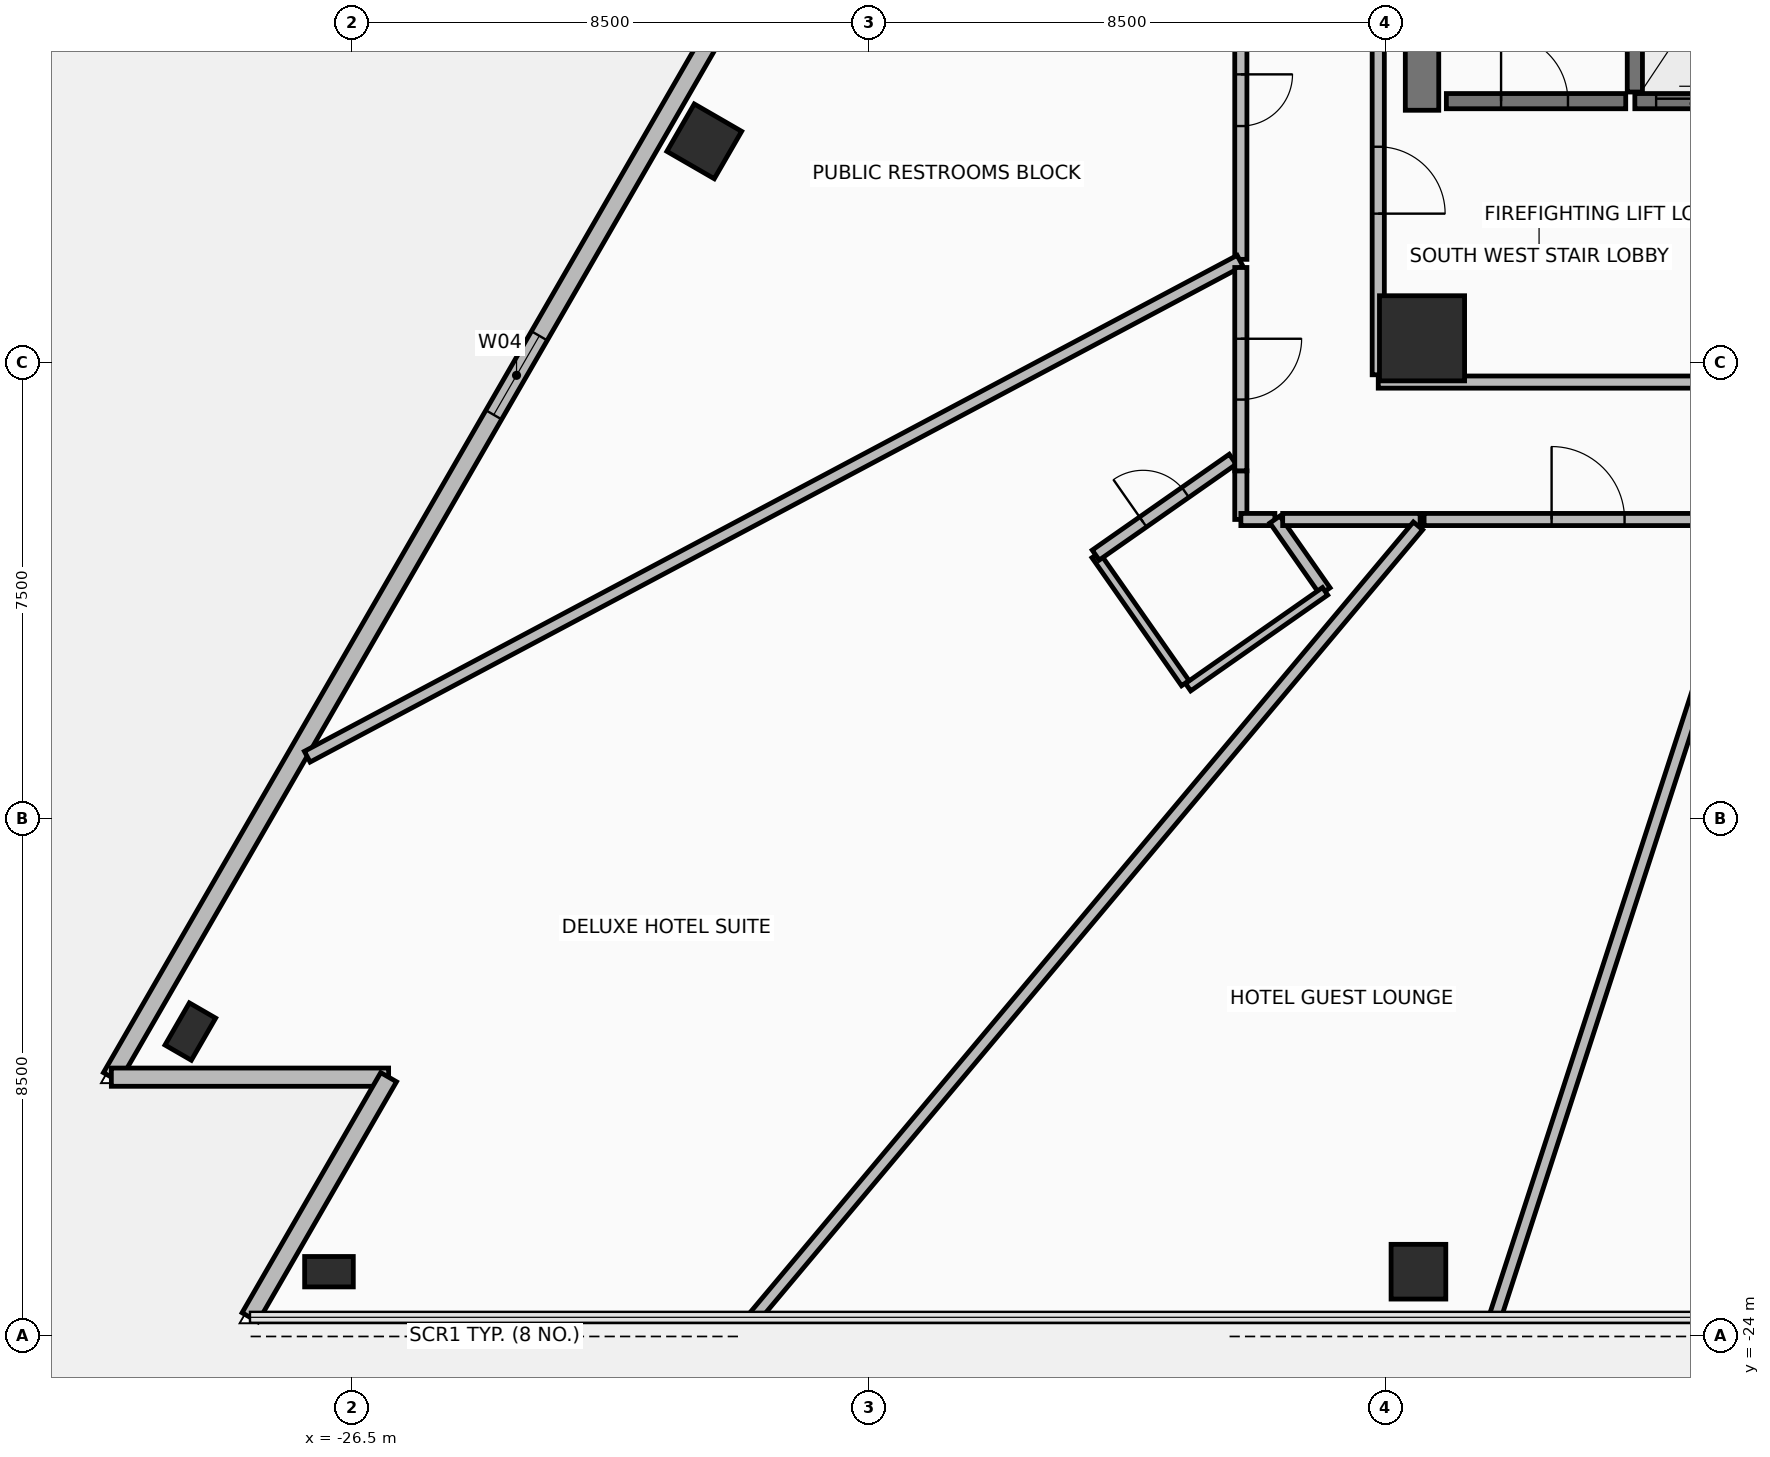
"""IFC4 building model, lengths in metres.
Left out: names, types, materials, properties, quantities, classifications, styles, units other than length and angle.
Written with IfcOpenShell. Run it as: python <this file> out.ifc"""

import sys

from ifc_helpers import new_model, si_unit, direction, frame, frame_2d, origin, origin_2d, place, context, subcontext, project, spatial, rectangle, hollow_rectangle, extrude, element, fill, save


model = new_model("IFC4")
c1 = context("Model", 3, precision=1e-05, world=origin(), true_north=direction((0.0, 1.0)))
c2 = subcontext(c1, "Body", "Model", "MODEL_VIEW")
j1 = project(units=[si_unit("LENGTHUNIT", "METRE"), si_unit("PLANEANGLEUNIT", "RADIAN")], contexts=[c1])
p1 = place(None, origin())
s1 = spatial("IfcSite", under=j1, at=p1, CompositionType="ELEMENT")
p2 = place(p1, origin())
s2 = spatial("IfcBuilding", under=s1, at=p2, CompositionType="ELEMENT")
p3 = place(p2, frame((0.0, 0.0, 31.8)))
s3 = spatial("IfcBuildingStorey", under=s2, at=p3, CompositionType="ELEMENT", Elevation=31.8)
p4 = place(p3, frame((-8.9, -7.6, 0.0), z_axis=(0.0, 0.0, 1.0), x_axis=(1.0, 0.0, 0.0)))
e1 = element("IfcColumn", 1, at=p4, inside=s3, PredefinedType="COLUMN", context=c2, shape_type="SweptSolid", body=[
    extrude(rectangle(XDim=1.4, YDim=1.4, at=origin_2d()), origin(), (0.0, 0.0, 1.0), 3.45),
])
p5 = place(p3, frame((-20.705, -4.361, 0.0), z_axis=(0.0, 0.0, 1.0), x_axis=(0.500001511499, 0.866024531118, 0.0)))
e2 = element("IfcColumn", 2, at=p5, inside=s3, PredefinedType="COLUMN", context=c2, shape_type="SweptSolid", body=[
    extrude(hollow_rectangle(XDim=0.9, YDim=0.9, WallThickness=0.05, at=origin_2d()), origin(), (0.0, 0.0, 1.0), 3.45),
])
for number, where, z_axis, x_axis in (
    (3, (-29.157, -19.001, 0.0), (0.0, 0.0, 1.0), (0.5, 0.866, 0.0)),
    (4, (-26.877, -22.95, 0.0), (0.0, 0.0, 1.0), (1.0, 0.0, 0.0)),
):
    element("IfcColumn", number, at=place(p3, frame(where, z_axis=z_axis, x_axis=x_axis)), inside=s3, PredefinedType="COLUMN", context=c2, shape_type="SweptSolid", body=[
        extrude(hollow_rectangle(XDim=0.5, YDim=0.8, WallThickness=0.04, at=origin_2d()), origin(), (0.0, 0.0, 1.0), 3.45),
    ])
p6 = place(p3, frame((-8.959, -22.95, 0.0), z_axis=(0.0, 0.0, 1.0), x_axis=(1.0, 0.0, 0.0)))
e5 = element("IfcColumn", 5, at=p6, inside=s3, PredefinedType="COLUMN", context=c2, shape_type="SweptSolid", body=[
    extrude(hollow_rectangle(XDim=0.9, YDim=0.9, WallThickness=0.05, at=origin_2d()), origin(), (0.0, 0.0, 1.0), 3.45),
])
p7 = place(p3, frame((-3.8, 26.418, 0.0), z_axis=(0.0, 0.0, 1.0), x_axis=(-0.499999546436, -0.86602566565, 0.0)))
e6 = element("IfcWall", 6, at=p7, inside=s3, PredefinedType="STANDARD", context=c2, shape_type="SweptSolid", body=[
    extrude(rectangle(XDim=53.312, YDim=0.3, at=frame_2d((26.656, 0.0))), origin(), (0.0, 0.0, 1.0), 3.275),
])
p8 = place(p7, frame((25.756, 0.0, 0.0)))
e7 = element("IfcOpeningElement", 7, at=p8, cuts=e6, PredefinedType="OPENING", context=c2, shape_type="SweptSolid", body=[
    extrude(rectangle(XDim=1.8, YDim=2.3, at=frame_2d((0.9, 1.15))), frame((0.0, 0.16, 0.0), z_axis=(0.0, -1.0, 0.0), x_axis=(1.0, 0.0, 0.0)), (0.0, 0.0, 1.0), 0.32),
])
p9 = place(p7, frame((12.578, 0.0, 0.85)))
e8 = element("IfcOpeningElement", 8, at=p9, cuts=e6, PredefinedType="OPENING", context=c2, shape_type="SweptSolid", body=[
    extrude(rectangle(XDim=1.5, YDim=2.1, at=frame_2d((0.75, 1.05))), frame((0.0, 0.16, 0.0), z_axis=(0.0, -1.0, 0.0), x_axis=(1.0, 0.0, 0.0)), (0.0, 0.0, 1.0), 0.32),
])
p10 = place(p7, frame((39.234, 0.0, 0.85)))
e9 = element("IfcOpeningElement", 9, at=p10, cuts=e6, PredefinedType="OPENING", context=c2, shape_type="SweptSolid", body=[
    extrude(rectangle(XDim=1.5, YDim=2.1, at=frame_2d((0.75, 1.05))), frame((0.0, 0.16, 0.0), z_axis=(0.0, -1.0, 0.0), x_axis=(1.0, 0.0, 0.0)), (0.0, 0.0, 1.0), 0.32),
])
p11 = place(p3, frame((-30.456, -19.751, 0.0), z_axis=(0.0, 0.0, 1.0), x_axis=(1.0, 0.0, 0.0)))
e10 = element("IfcWall", 10, at=p11, inside=s3, PredefinedType="STANDARD", context=c2, shape_type="SweptSolid", body=[
    extrude(rectangle(XDim=4.56, YDim=0.3, at=frame_2d((2.28, 0.0))), origin(), (0.0, 0.0, 1.0), 2.47),
])
p12 = place(p3, frame((-25.896, -19.751, 0.0), z_axis=(0.0, 0.0, 1.0), x_axis=(-0.500014431597, -0.866017071537, 0.0)))
e11 = element("IfcWall", 11, at=p12, inside=s3, PredefinedType="STANDARD", context=c2, shape_type="SweptSolid", body=[
    extrude(rectangle(XDim=4.56, YDim=0.3, at=frame_2d((2.28, 0.0))), origin(), (0.0, 0.0, 1.0), 2.47),
])
p13 = place(p3, frame((-8.9, -3.85, 0.0), z_axis=(0.0, 0.0, 1.0), x_axis=(0.0, 1.0, 0.0)))
e12 = element("IfcWall", 12, at=p13, inside=s3, PredefinedType="SHEAR", context=c2, shape_type="SweptSolid", body=[
    extrude(rectangle(XDim=10.7, YDim=0.55, at=frame_2d((5.35, 0.0))), origin(), (0.0, 0.0, 1.0), 3.275),
])
p14 = place(p3, frame((-9.62, -8.32, 0.0), z_axis=(0.0, 0.0, 1.0), x_axis=(1.0, 0.0, 0.0)))
e13 = element("IfcWall", 13, at=p14, inside=s3, PredefinedType="PARTITIONING", context=c2, shape_type="SweptSolid", body=[
    extrude(rectangle(XDim=19.24, YDim=0.2, at=frame_2d((9.62, 0.0))), origin(), (0.0, 0.0, 1.0), 2.67),
])
p15 = place(p3, frame((-9.62, 8.2, 0.0), z_axis=(0.0, 0.0, 1.0), x_axis=(0.0, -1.0, 0.0)))
e14 = element("IfcWall", 14, at=p15, inside=s3, PredefinedType="PARTITIONING", context=c2, shape_type="SweptSolid", body=[
    extrude(rectangle(XDim=16.4, YDim=0.2, at=frame_2d((8.2, 0.0))), origin(), (0.0, 0.0, 1.0), 2.67),
])
p16 = place(p15, frame((12.65, 0.0, 0.0)))
e15 = element("IfcOpeningElement", 15, at=p16, cuts=e14, PredefinedType="OPENING", context=c2, shape_type="SweptSolid", body=[
    extrude(rectangle(XDim=1.1, YDim=2.15, at=frame_2d((0.55, 1.075))), frame((0.0, 0.11, 0.0), z_axis=(0.0, -1.0, 0.0), x_axis=(1.0, 0.0, 0.0)), (0.0, 0.0, 1.0), 0.22),
])
p17 = place(p3, frame((-5.4, -3.55, 0.0), z_axis=(0.0, 0.0, 1.0), x_axis=(0.0, 1.0, 0.0)))
e16 = element("IfcWall", 16, at=p17, inside=s3, PredefinedType="SHEAR", context=c2, shape_type="SweptSolid", body=[
    extrude(rectangle(XDim=7.3, YDim=0.25, at=frame_2d((3.65, 0.0))), origin(), (0.0, 0.0, 1.0), 3.275),
])
p18 = place(p3, frame((-8.5, -3.7, 0.0), z_axis=(0.0, 0.0, 1.0), x_axis=(1.0, 0.0, 0.0)))
e17 = element("IfcWall", 17, at=p18, inside=s3, PredefinedType="SHEAR", context=c2, shape_type="SweptSolid", body=[
    extrude(rectangle(XDim=2.95, YDim=0.25, at=frame_2d((1.475, 0.0))), origin(), (0.0, 0.0, 1.0), 3.275),
])
p19 = place(p18, frame((0.9, 0.0, 0.0)))
e18 = element("IfcOpeningElement", 18, at=p19, cuts=e17, PredefinedType="OPENING", context=c2, shape_type="SweptSolid", body=[
    extrude(rectangle(XDim=1.1, YDim=2.15, at=frame_2d((0.55, 1.075))), frame((0.0, 0.135, 0.0), z_axis=(0.0, -1.0, 0.0), x_axis=(1.0, 0.0, 0.0)), (0.0, 0.0, 1.0), 0.27),
])
p20 = place(p3, frame((-5.4, -3.7, 0.0), z_axis=(0.0, 0.0, 1.0), x_axis=(1.0, 0.0, 0.0)))
e19 = element("IfcWall", 19, at=p20, inside=s3, PredefinedType="SHEAR", context=c2, shape_type="SweptSolid", body=[
    extrude(rectangle(XDim=1.9, YDim=0.25, at=frame_2d((0.95, 0.0))), origin(), (0.0, 0.0, 1.0), 3.275),
])
p21 = place(p20, frame((0.35, 0.0, 0.0)))
e20 = element("IfcOpeningElement", 20, at=p21, cuts=e19, PredefinedType="OPENING", context=c2, shape_type="SweptSolid", body=[
    extrude(rectangle(XDim=1.2, YDim=2.2, at=frame_2d((0.6, 1.1))), frame((0.0, 0.135, 0.0), z_axis=(0.0, -1.0, 0.0), x_axis=(1.0, 0.0, 0.0)), (0.0, 0.0, 1.0), 0.27),
])
p22 = place(p3, frame((-11.88, -9.78, 0.0), z_axis=(0.0, 0.0, 1.0), x_axis=(0.0, -1.0, 0.0)))
e21 = element("IfcWall", 21, at=p22, inside=s3, PredefinedType="PARTITIONING", context=c2, shape_type="SweptSolid", body=[
    extrude(rectangle(XDim=0.8, YDim=0.2, at=frame_2d((0.4, 0.0))), origin(), (0.0, 0.0, 1.0), 2.67),
])
p23 = place(p3, frame((-11.879, -10.58, 0.0), z_axis=(0.0, 0.0, 1.0), x_axis=(1.0, 0.0, 0.0)))
e22 = element("IfcWall", 22, at=p23, inside=s3, PredefinedType="PARTITIONING", context=c2, shape_type="SweptSolid", body=[
    extrude(rectangle(XDim=0.559, YDim=0.2, at=frame_2d((0.28, 0.0))), origin(), (0.0, 0.0, 1.0), 3.275),
])
p24 = place(p3, frame((-11.32, -10.58, 0.0), z_axis=(0.0, 0.0, 1.0), x_axis=(0.573177949093, -0.819430923674, 0.0)))
e23 = element("IfcWall", 23, at=p24, inside=s3, PredefinedType="PARTITIONING", context=c2, shape_type="SweptSolid", body=[
    extrude(rectangle(XDim=1.44, YDim=0.2, at=frame_2d((0.72, 0.0))), origin(), (0.0, 0.0, 1.0), 3.275),
])
p25 = place(p3, frame((-10.494, -11.76, 0.0), z_axis=(0.0, 0.0, 1.0), x_axis=(-0.819398712469, -0.573223996361, 0.0)))
e24 = element("IfcWall", 24, at=p25, inside=s3, PredefinedType="PARTITIONING", context=c2, shape_type="SweptSolid", body=[
    extrude(rectangle(XDim=2.75, YDim=0.15, at=frame_2d((1.375, 0.0))), origin(), (0.0, 0.0, 1.0), 3.275),
])
p26 = place(p3, frame((-12.794, -13.271, 0.0), z_axis=(0.0, 0.0, 1.0), x_axis=(-0.573130756233, 0.819463932251, 0.0)))
e25 = element("IfcWall", 25, at=p26, inside=s3, PredefinedType="PARTITIONING", context=c2, shape_type="SweptSolid", body=[
    extrude(rectangle(XDim=2.57, YDim=0.15, at=frame_2d((1.285, 0.0))), origin(), (0.0, 0.0, 1.0), 2.67),
])
p27 = place(p3, frame((-14.267, -11.165, 0.0), z_axis=(0.0, 0.0, 1.0), x_axis=(0.81944041023, 0.573164386614, 0.0)))
e26 = element("IfcWall", 26, at=p27, inside=s3, PredefinedType="PARTITIONING", context=c2, shape_type="SweptSolid", body=[
    extrude(rectangle(XDim=2.75, YDim=0.2, at=frame_2d((1.375, 0.0))), origin(), (0.0, 0.0, 1.0), 2.67),
])
p28 = place(p27, frame((0.95, 0.0, 0.0)))
e27 = element("IfcOpeningElement", 27, at=p28, cuts=e26, PredefinedType="OPENING", context=c2, shape_type="SweptSolid", body=[
    extrude(rectangle(XDim=0.85, YDim=2.1, at=frame_2d((0.425, 1.05))), frame((0.0, 0.11, 0.0), z_axis=(0.0, -1.0, 0.0), x_axis=(1.0, 0.0, 0.0)), (0.0, 0.0, 1.0), 0.22),
])
p29 = place(p3, frame((-11.88, -1.067, 0.0), z_axis=(0.0, 0.0, 1.0), x_axis=(0.0, -1.0, 0.0)))
e28 = element("IfcWall", 28, at=p29, inside=s3, PredefinedType="PARTITIONING", context=c2, shape_type="SweptSolid", body=[
    extrude(rectangle(XDim=5.235, YDim=0.2, at=frame_2d((2.618, 0.0))), origin(), (0.0, 0.0, 1.0), 3.275),
])
p30 = place(p29, frame((2.193, 0.0, 0.0)))
e29 = element("IfcOpeningElement", 29, at=p30, cuts=e28, PredefinedType="OPENING", context=c2, shape_type="SweptSolid", body=[
    extrude(rectangle(XDim=0.85, YDim=2.1, at=frame_2d((0.425, 1.05))), frame((0.0, 0.11, 0.0), z_axis=(0.0, -1.0, 0.0), x_axis=(1.0, 0.0, 0.0)), (0.0, 0.0, 1.0), 0.22),
])
p31 = place(p3, frame((-11.893, -6.324, 0.0), z_axis=(0.0, 0.0, 1.0), x_axis=(-0.882947372325, -0.46947197755, 0.0)))
e30 = element("IfcWall", 30, at=p31, inside=s3, PredefinedType="PARTITIONING", context=c2, shape_type="SweptSolid", body=[
    extrude(rectangle(XDim=17.374, YDim=0.2, at=frame_2d((8.687, 0.0))), origin(), (0.0, 0.0, 1.0), 2.47),
])
p32 = place(p3, frame((-11.88, -6.436, 0.0), z_axis=(0.0, 0.0, 1.0), x_axis=(0.0, -1.0, 0.0)))
e31 = element("IfcWall", 31, at=p32, inside=s3, PredefinedType="PARTITIONING", context=c2, shape_type="SweptSolid", body=[
    extrude(rectangle(XDim=3.344, YDim=0.2, at=frame_2d((1.672, 0.0))), origin(), (0.0, 0.0, 1.0), 2.67),
])
p33 = place(p32, frame((1.172, 0.0, 0.0)))
e32 = element("IfcOpeningElement", 32, at=p33, cuts=e31, PredefinedType="OPENING", context=c2, shape_type="SweptSolid", body=[
    extrude(rectangle(XDim=1.0, YDim=2.15, at=frame_2d((0.5, 1.075))), frame((0.0, 0.11, 0.0), z_axis=(0.0, -1.0, 0.0), x_axis=(1.0, 0.0, 0.0)), (0.0, 0.0, 1.0), 0.22),
])
p34 = place(p3, frame((-11.192, -10.58, 0.0), z_axis=(0.0, 0.0, 1.0), x_axis=(1.0, 0.0, 0.0)))
e33 = element("IfcWall", 33, at=p34, inside=s3, PredefinedType="PARTITIONING", context=c2, shape_type="SweptSolid", body=[
    extrude(rectangle(XDim=2.26, YDim=0.2, at=frame_2d((1.13, 0.0))), origin(), (0.0, 0.0, 1.0), 2.67),
])
p35 = place(p3, frame((-8.966, -10.685, 0.0), z_axis=(0.0, 0.0, 1.0), x_axis=(-0.642784617016, -0.766046954258, 0.0)))
e34 = element("IfcWall", 34, at=p35, inside=s3, PredefinedType="PARTITIONING", context=c2, shape_type="SweptSolid", body=[
    extrude(rectangle(XDim=16.978, YDim=0.2, at=frame_2d((8.489, 0.0))), origin(), (0.0, 0.0, 1.0), 2.47),
])
p36 = place(p3, frame((-8.866, -10.58, 0.0), z_axis=(0.0, 0.0, 1.0), x_axis=(1.0, 0.0, 0.0)))
e35 = element("IfcWall", 35, at=p36, inside=s3, PredefinedType="PARTITIONING", context=c2, shape_type="SweptSolid", body=[
    extrude(rectangle(XDim=5.394, YDim=0.2, at=frame_2d((2.697, 0.0))), origin(), (0.0, 0.0, 1.0), 2.67),
])
p37 = place(p36, frame((2.097, 0.0, 0.0)))
e36 = element("IfcOpeningElement", 36, at=p37, cuts=e35, PredefinedType="OPENING", context=c2, shape_type="SweptSolid", body=[
    extrude(rectangle(XDim=1.2, YDim=2.15, at=frame_2d((0.6, 1.075))), frame((0.0, 0.11, 0.0), z_axis=(0.0, -1.0, 0.0), x_axis=(1.0, 0.0, 0.0)), (0.0, 0.0, 1.0), 0.22),
])
p38 = place(p3, frame((-3.448, -10.613, 0.0), z_axis=(0.0, 0.0, 1.0), x_axis=(-0.309029029702, -0.951052605696, 0.0)))
e37 = element("IfcWall", 37, at=p38, inside=s3, PredefinedType="PARTITIONING", context=c2, shape_type="SweptSolid", body=[
    extrude(rectangle(XDim=13.742, YDim=0.2, at=frame_2d((6.871, 0.0))), origin(), (0.0, 0.0, 1.0), 2.47),
])
p39 = place(p10, origin())
e38 = element("IfcWindow", 38, at=p39, inside=s3, PartitioningType="SINGLE_PANEL", PredefinedType="WINDOW", context=c2, shape_type="SweptSolid", body=[
    extrude(rectangle(XDim=1.5, YDim=2.1, at=frame_2d((0.75, 1.05))), frame((0.0, 0.03, 0.0), z_axis=(0.0, -1.0, 0.0), x_axis=(1.0, 0.0, 0.0)), (0.0, 0.0, 1.0), 0.06),
])
fill(e9, e38)
p40 = place(p16, frame((1.1, 0.0, 0.0), z_axis=(0.0, 0.0, 1.0), x_axis=(-1.0, 0.0, 0.0)))
e39 = element("IfcDoor", 39, at=p40, inside=s3, OperationType="SINGLE_SWING_LEFT", PredefinedType="DOOR", context=c2, shape_type="SweptSolid", body=[
    extrude(rectangle(XDim=1.1, YDim=2.15, at=frame_2d((0.55, 1.075))), frame((0.0, 0.025, 0.0), z_axis=(0.0, -1.0, 0.0), x_axis=(1.0, 0.0, 0.0)), (0.0, 0.0, 1.0), 0.05),
])
fill(e15, e39)
p41 = place(p19, origin())
e40 = element("IfcDoor", 40, at=p41, inside=s3, OperationType="SINGLE_SWING_LEFT", PredefinedType="DOOR", context=c2, shape_type="SweptSolid", body=[
    extrude(rectangle(XDim=1.1, YDim=2.15, at=frame_2d((0.55, 1.075))), frame((0.0, 0.025, 0.0), z_axis=(0.0, -1.0, 0.0), x_axis=(1.0, 0.0, 0.0)), (0.0, 0.0, 1.0), 0.05),
])
fill(e18, e40)
p42 = place(p21, origin())
e41 = element("IfcDoor", 41, at=p42, inside=s3, OperationType="SLIDING_TO_RIGHT", PredefinedType="DOOR", context=c2, shape_type="SweptSolid", body=[
    extrude(rectangle(XDim=1.2, YDim=2.2, at=frame_2d((0.6, 1.1))), frame((0.0, 0.025, 0.0), z_axis=(0.0, -1.0, 0.0), x_axis=(1.0, 0.0, 0.0)), (0.0, 0.0, 1.0), 0.05),
])
fill(e20, e41)
p43 = place(p28, origin())
e42 = element("IfcDoor", 42, at=p43, inside=s3, OperationType="SINGLE_SWING_RIGHT", PredefinedType="DOOR", context=c2, shape_type="SweptSolid", body=[
    extrude(rectangle(XDim=0.85, YDim=2.1, at=frame_2d((0.425, 1.05))), frame((0.0, 0.025, 0.0), z_axis=(0.0, -1.0, 0.0), x_axis=(1.0, 0.0, 0.0)), (0.0, 0.0, 1.0), 0.05),
])
fill(e27, e42)
p44 = place(p30, origin())
e43 = element("IfcDoor", 43, at=p44, inside=s3, OperationType="SINGLE_SWING_RIGHT", PredefinedType="DOOR", context=c2, shape_type="SweptSolid", body=[
    extrude(rectangle(XDim=0.85, YDim=2.1, at=frame_2d((0.425, 1.05))), frame((0.0, 0.025, 0.0), z_axis=(0.0, -1.0, 0.0), x_axis=(1.0, 0.0, 0.0)), (0.0, 0.0, 1.0), 0.05),
])
fill(e29, e43)
p45 = place(p33, origin())
e44 = element("IfcDoor", 44, at=p45, inside=s3, OperationType="SINGLE_SWING_LEFT", PredefinedType="DOOR", context=c2, shape_type="SweptSolid", body=[
    extrude(rectangle(XDim=1.0, YDim=2.15, at=frame_2d((0.5, 1.075))), frame((0.0, 0.025, 0.0), z_axis=(0.0, -1.0, 0.0), x_axis=(1.0, 0.0, 0.0)), (0.0, 0.0, 1.0), 0.05),
])
fill(e32, e44)
p46 = place(p37, origin())
e45 = element("IfcDoor", 45, at=p46, inside=s3, OperationType="SINGLE_SWING_LEFT", PredefinedType="DOOR", context=c2, shape_type="SweptSolid", body=[
    extrude(rectangle(XDim=1.2, YDim=2.15, at=frame_2d((0.6, 1.075))), frame((0.0, 0.025, 0.0), z_axis=(0.0, -1.0, 0.0), x_axis=(1.0, 0.0, 0.0)), (0.0, 0.0, 1.0), 0.05),
])
fill(e36, e45)
save(model, sys.argv[1])
